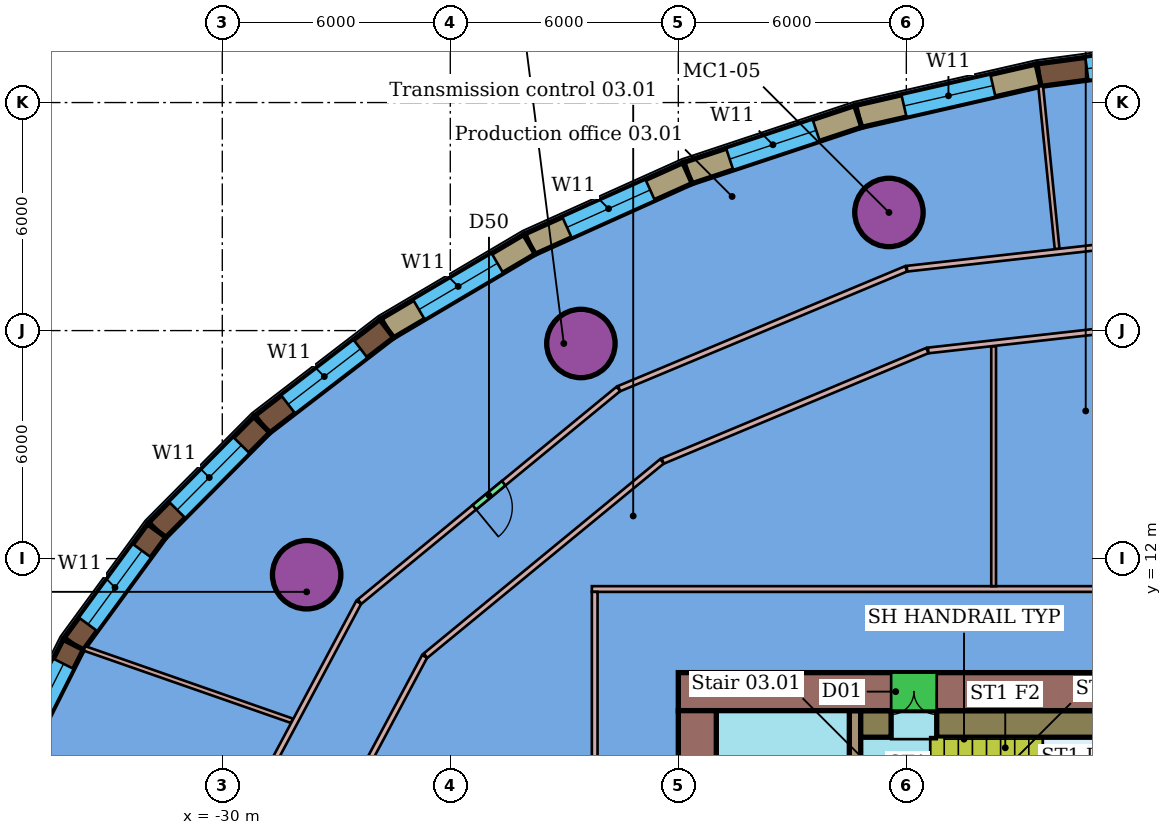
"""IFC4 building model, lengths in metres.
Left out: names, types, materials, properties, quantities, classifications, styles, units other than length and angle.
Written with IfcOpenShell. Run it as: python <this file> out.ifc"""

import sys

from ifc_helpers import new_model, si_unit, direction, frame, frame_2d, origin, origin_2d, place, context, subcontext, project, spatial, rectangle, hollow_circle, extrude, element, fill, save


model = new_model("IFC4")
c1 = context("Model", 3, precision=1e-05, world=origin(), true_north=direction((0.0, 1.0)))
c2 = subcontext(c1, "Body", "Model", "MODEL_VIEW")
j1 = project(units=[si_unit("LENGTHUNIT", "METRE"), si_unit("PLANEANGLEUNIT", "RADIAN")], contexts=[c1])
p1 = place(None, origin())
s1 = spatial("IfcSite", under=j1, at=p1, CompositionType="ELEMENT")
p2 = place(p1, origin())
s2 = spatial("IfcBuilding", under=s1, at=p2, CompositionType="ELEMENT")
p3 = place(p2, frame((0.0, 0.0, 26.0)))
s3 = spatial("IfcBuildingStorey", under=s2, at=p3, CompositionType="ELEMENT", Elevation=26.0)
for number, where, z_axis, x_axis in (
    (1, (-12.458, 21.108, 0.0), (0.0, 0.0, 1.0), (1.0, 0.0, 0.0)),
    (2, (-20.563, 17.66, 0.0), (0.0, 0.0, 1.0), (1.0, 0.0, 0.0)),
    (3, (-27.78, 11.576, 0.0), (0.0, 0.0, 1.0), (1.0, 0.0, 0.0)),
):
    element("IfcColumn", number, at=place(p3, frame(where, z_axis=z_axis, x_axis=x_axis)), inside=s3, PredefinedType="COLUMN", context=c2, shape_type="SweptSolid", body=[
        extrude(hollow_circle(Radius=0.9, WallThickness=0.06, at=origin_2d()), origin(), (0.0, 0.0, 1.0), 5.3),
    ])
p4 = place(p3, frame((-20.275, 11.2, 0.0), z_axis=(0.0, 0.0, 1.0), x_axis=(1.0, 0.0, 0.0)))
e4 = element("IfcWall", 4, at=p4, inside=s3, PredefinedType="PARTITIONING", context=c2, shape_type="SweptSolid", body=[
    extrude(rectangle(XDim=32.372, YDim=0.15, at=frame_2d((16.186, 0.0))), origin(), (0.0, 0.0, 1.0), 4.6),
])
p5 = place(p3, frame((-20.2, -9.075, 0.0), z_axis=(0.0, 0.0, 1.0), x_axis=(0.0, 1.0, 0.0)))
e5 = element("IfcWall", 5, at=p5, inside=s3, PredefinedType="PARTITIONING", context=c2, shape_type="SweptSolid", body=[
    extrude(rectangle(XDim=20.2, YDim=0.15, at=frame_2d((10.1, 0.0))), origin(), (0.0, 0.0, 1.0), 4.6),
])
p6 = place(p3, frame((-9.703, 11.275, 0.0), z_axis=(0.0, 0.0, 1.0), x_axis=(0.0, 1.0, 0.0)))
e6 = element("IfcWall", 6, at=p6, inside=s3, PredefinedType="PARTITIONING", context=c2, shape_type="SweptSolid", body=[
    extrude(rectangle(XDim=6.313, YDim=0.125, at=frame_2d((3.156, 0.0))), origin(), (0.0, 0.0, 1.0), 4.6),
])
p7 = place(p3, frame((-11.425, 17.477, 0.0), z_axis=(0.0, 0.0, 1.0), x_axis=(0.993762158865, 0.111520274427, 0.0)))
e7 = element("IfcWall", 7, at=p7, inside=s3, PredefinedType="PARTITIONING", context=c2, shape_type="SweptSolid", body=[
    extrude(rectangle(XDim=7.334, YDim=0.15, at=frame_2d((3.667, 0.0))), origin(), (0.0, 0.0, 1.0), 4.6),
])
p8 = place(p3, frame((-28.674, 1.933, 0.0), z_axis=(0.0, 0.0, 1.0), x_axis=(0.470743396375, 0.882270171076, 0.0)))
e8 = element("IfcWall", 8, at=p8, inside=s3, PredefinedType="PARTITIONING", context=c2, shape_type="SweptSolid", body=[
    extrude(rectangle(XDim=8.493, YDim=0.15, at=frame_2d((4.247, 0.0))), origin(), (0.0, 0.0, 1.0), 4.6),
])
p9 = place(p3, frame((-24.652, 9.446, 0.0), z_axis=(0.0, 0.0, 1.0), x_axis=(0.772569565922, 0.634930126716, 0.0)))
e9 = element("IfcWall", 9, at=p9, inside=s3, PredefinedType="PARTITIONING", context=c2, shape_type="SweptSolid", body=[
    extrude(rectangle(XDim=8.053, YDim=0.15, at=frame_2d((4.026, 0.0))), origin(), (0.0, 0.0, 1.0), 4.6),
])
p10 = place(p3, frame((-18.41, 14.568, 0.0), z_axis=(0.0, 0.0, 1.0), x_axis=(0.922821127206, 0.38522872061, 0.0)))
e10 = element("IfcWall", 10, at=p10, inside=s3, PredefinedType="PARTITIONING", context=c2, shape_type="SweptSolid", body=[
    extrude(rectangle(XDim=7.545, YDim=0.15, at=frame_2d((3.773, 0.0))), origin(), (0.0, 0.0, 1.0), 4.6),
])
p11 = place(p3, frame((-8.464, 24.426, 0.0), z_axis=(0.0, 0.0, 1.0), x_axis=(0.100391964529, -0.994947965201, 0.0)))
e11 = element("IfcWall", 11, at=p11, inside=s3, PredefinedType="PARTITIONING", context=c2, shape_type="SweptSolid", body=[
    extrude(rectangle(XDim=4.3, YDim=0.125, at=frame_2d((2.15, 0.0))), origin(), (0.0, 0.0, 1.0), 4.6),
])
p12 = place(p3, frame((-11.982, 19.628, 0.0), z_axis=(0.0, 0.0, 1.0), x_axis=(0.993764533241, 0.11149911422, 0.0)))
e12 = element("IfcWall", 12, at=p12, inside=s3, PredefinedType="PARTITIONING", context=c2, shape_type="SweptSolid", body=[
    extrude(rectangle(XDim=7.981, YDim=0.15, at=frame_2d((3.991, 0.0))), origin(), (0.0, 0.0, 1.0), 4.6),
])
p13 = place(p3, frame((-33.626, 9.637, 0.0), z_axis=(0.0, 0.0, 1.0), x_axis=(0.944198348273, -0.329377411368, 0.0)))
e13 = element("IfcWall", 13, at=p13, inside=s3, PredefinedType="PARTITIONING", context=c2, shape_type="SweptSolid", body=[
    extrude(rectangle(XDim=5.779, YDim=0.125, at=frame_2d((2.89, 0.0))), origin(), (0.0, 0.0, 1.0), 4.6),
])
p14 = place(p3, frame((-19.556, 16.473, 0.0), z_axis=(0.0, 0.0, 1.0), x_axis=(0.922818121352, 0.385235921097, 0.0)))
e14 = element("IfcWall", 14, at=p14, inside=s3, PredefinedType="PARTITIONING", context=c2, shape_type="SweptSolid", body=[
    extrude(rectangle(XDim=8.184, YDim=0.15, at=frame_2d((4.092, 0.0))), origin(), (0.0, 0.0, 1.0), 4.6),
])
p15 = place(p3, frame((-19.577, 16.465, 0.0), z_axis=(0.0, 0.0, 1.0), x_axis=(-0.772575830308, -0.634922504266, 0.0)))
e15 = element("IfcWall", 15, at=p15, inside=s3, PredefinedType="PARTITIONING", context=c2, shape_type="SweptSolid", body=[
    extrude(rectangle(XDim=8.815, YDim=0.15, at=frame_2d((4.407, 0.0))), origin(), (0.0, 0.0, 1.0), 4.6),
])
p16 = place(p15, frame((3.907, 0.0, 0.0)))
e16 = element("IfcOpeningElement", 16, at=p16, cuts=e15, PredefinedType="OPENING", context=c2, shape_type="SweptSolid", body=[
    extrude(rectangle(XDim=1.0, YDim=2.1, at=frame_2d((0.5, 1.05))), frame((0.0, 0.085, 0.0), z_axis=(0.0, -1.0, 0.0), x_axis=(1.0, 0.0, 0.0)), (0.0, 0.0, 1.0), 0.17),
])
p17 = place(p3, frame((-30.898, 2.438, 0.0), z_axis=(0.0, 0.0, 1.0), x_axis=(0.470742429837, 0.88227068678, 0.0)))
e17 = element("IfcWall", 17, at=p17, inside=s3, PredefinedType="PARTITIONING", context=c2, shape_type="SweptSolid", body=[
    extrude(rectangle(XDim=9.532, YDim=0.15, at=frame_2d((4.766, 0.0))), origin(), (0.0, 0.0, 1.0), 4.6),
])
p18 = place(p3, frame((-3.603, 25.379, 0.0), z_axis=(0.0, 0.0, 1.0), x_axis=(-0.991143444913, -0.132795600853, 0.0)))
e18 = element("IfcWall", 18, at=p18, inside=s3, PredefinedType="SOLIDWALL", context=c2, shape_type="SweptSolid", body=[
    extrude(rectangle(XDim=4.96, YDim=0.6, at=frame_2d((2.48, 0.0))), origin(), (0.0, 0.0, 1.0), 5.3),
])
p19 = place(p18, frame((1.28, 0.0, 1.1)))
e19 = element("IfcOpeningElement", 19, at=p19, cuts=e18, PredefinedType="OPENING", context=c2, shape_type="SweptSolid", body=[
    extrude(rectangle(XDim=2.4, YDim=1.4, at=frame_2d((1.2, 0.7))), frame((0.0, 0.31, 0.0), z_axis=(0.0, -1.0, 0.0), x_axis=(1.0, 0.0, 0.0)), (0.0, 0.0, 1.0), 0.62),
])
p20 = place(p3, frame((-8.519, 24.72, 0.0), z_axis=(0.0, 0.0, 1.0), x_axis=(-0.97483982486, -0.222906518224, 0.0)))
e20 = element("IfcWall", 20, at=p20, inside=s3, PredefinedType="SOLIDWALL", context=c2, shape_type="SweptSolid", body=[
    extrude(rectangle(XDim=4.867, YDim=0.6, at=frame_2d((2.434, 0.0))), origin(), (0.0, 0.0, 1.0), 4.9),
])
p21 = place(p20, frame((1.234, 0.0, 1.1)))
e21 = element("IfcOpeningElement", 21, at=p21, cuts=e20, PredefinedType="OPENING", context=c2, shape_type="SweptSolid", body=[
    extrude(rectangle(XDim=2.4, YDim=1.4, at=frame_2d((1.2, 0.7))), frame((0.0, 0.31, 0.0), z_axis=(0.0, -1.0, 0.0), x_axis=(1.0, 0.0, 0.0)), (0.0, 0.0, 1.0), 0.62),
])
p22 = place(p3, frame((-13.264, 23.635, 0.0), z_axis=(0.0, 0.0, 1.0), x_axis=(-0.94901810672, -0.315221561949, 0.0)))
e22 = element("IfcWall", 22, at=p22, inside=s3, PredefinedType="SOLIDWALL", context=c2, shape_type="SweptSolid", body=[
    extrude(rectangle(XDim=4.732, YDim=0.6, at=frame_2d((2.366, 0.0))), origin(), (0.0, 0.0, 1.0), 4.9),
])
p23 = place(p22, frame((1.166, 0.0, 1.1)))
e23 = element("IfcOpeningElement", 23, at=p23, cuts=e22, PredefinedType="OPENING", context=c2, shape_type="SweptSolid", body=[
    extrude(rectangle(XDim=2.4, YDim=1.4, at=frame_2d((1.2, 0.7))), frame((0.0, 0.31, 0.0), z_axis=(0.0, -1.0, 0.0), x_axis=(1.0, 0.0, 0.0)), (0.0, 0.0, 1.0), 0.62),
])
p24 = place(p3, frame((-17.755, 22.144, 0.0), z_axis=(0.0, 0.0, 1.0), x_axis=(-0.911894462824, -0.410424766152, 0.0)))
e24 = element("IfcWall", 24, at=p24, inside=s3, PredefinedType="SOLIDWALL", context=c2, shape_type="SweptSolid", body=[
    extrude(rectangle(XDim=4.561, YDim=0.6, at=frame_2d((2.281, 0.0))), origin(), (0.0, 0.0, 1.0), 4.9),
])
p25 = place(p24, frame((1.081, 0.0, 1.1)))
e25 = element("IfcOpeningElement", 25, at=p25, cuts=e24, PredefinedType="OPENING", context=c2, shape_type="SweptSolid", body=[
    extrude(rectangle(XDim=2.4, YDim=1.4, at=frame_2d((1.2, 0.7))), frame((0.0, 0.31, 0.0), z_axis=(0.0, -1.0, 0.0), x_axis=(1.0, 0.0, 0.0)), (0.0, 0.0, 1.0), 0.62),
])
p26 = place(p3, frame((-21.915, 20.272, 0.0), z_axis=(0.0, 0.0, 1.0), x_axis=(-0.861017868942, -0.508574703818, 0.0)))
e26 = element("IfcWall", 26, at=p26, inside=s3, PredefinedType="SOLIDWALL", context=c2, shape_type="SweptSolid", body=[
    extrude(rectangle(XDim=4.363, YDim=0.6, at=frame_2d((2.181, 0.0))), origin(), (0.0, 0.0, 1.0), 4.9),
])
p27 = place(p26, frame((0.981, 0.0, 1.1)))
e27 = element("IfcOpeningElement", 27, at=p27, cuts=e26, PredefinedType="OPENING", context=c2, shape_type="SweptSolid", body=[
    extrude(rectangle(XDim=2.4, YDim=1.4, at=frame_2d((1.2, 0.7))), frame((0.0, 0.31, 0.0), z_axis=(0.0, -1.0, 0.0), x_axis=(1.0, 0.0, 0.0)), (0.0, 0.0, 1.0), 0.62),
])
p28 = place(p3, frame((-25.671, 18.053, 0.0), z_axis=(0.0, 0.0, 1.0), x_axis=(-0.793065901338, -0.609135843745, 0.0)))
e28 = element("IfcWall", 28, at=p28, inside=s3, PredefinedType="SOLIDWALL", context=c2, shape_type="SweptSolid", body=[
    extrude(rectangle(XDim=4.147, YDim=0.6, at=frame_2d((2.073, 0.0))), origin(), (0.0, 0.0, 1.0), 5.3),
])
p29 = place(p28, frame((0.873, 0.0, 1.1)))
e29 = element("IfcOpeningElement", 29, at=p29, cuts=e28, PredefinedType="OPENING", context=c2, shape_type="SweptSolid", body=[
    extrude(rectangle(XDim=2.4, YDim=1.4, at=frame_2d((1.2, 0.7))), frame((0.0, 0.31, 0.0), z_axis=(0.0, -1.0, 0.0), x_axis=(1.0, 0.0, 0.0)), (0.0, 0.0, 1.0), 0.62),
])
p30 = place(p3, frame((-28.959, 15.527, 0.0), z_axis=(0.0, 0.0, 1.0), x_axis=(-0.704303183564, -0.709899306678, 0.0)))
e30 = element("IfcWall", 30, at=p30, inside=s3, PredefinedType="SOLIDWALL", context=c2, shape_type="SweptSolid", body=[
    extrude(rectangle(XDim=3.927, YDim=0.6, at=frame_2d((1.963, 0.0))), origin(), (0.0, 0.0, 1.0), 5.3),
])
p31 = place(p30, frame((0.763, 0.0, 1.1)))
e31 = element("IfcOpeningElement", 31, at=p31, cuts=e30, PredefinedType="OPENING", context=c2, shape_type="SweptSolid", body=[
    extrude(rectangle(XDim=2.4, YDim=1.4, at=frame_2d((1.2, 0.7))), frame((0.0, 0.31, 0.0), z_axis=(0.0, -1.0, 0.0), x_axis=(1.0, 0.0, 0.0)), (0.0, 0.0, 1.0), 0.62),
])
p32 = place(p3, frame((-31.725, 12.74, 0.0), z_axis=(0.0, 0.0, 1.0), x_axis=(-0.59073426953, -0.806866174035, 0.0)))
e32 = element("IfcWall", 32, at=p32, inside=s3, PredefinedType="SOLIDWALL", context=c2, shape_type="SweptSolid", body=[
    extrude(rectangle(XDim=3.718, YDim=0.6, at=frame_2d((1.859, 0.0))), origin(), (0.0, 0.0, 1.0), 5.3),
])
p33 = place(p32, frame((0.659, 0.0, 1.1)))
e33 = element("IfcOpeningElement", 33, at=p33, cuts=e32, PredefinedType="OPENING", context=c2, shape_type="SweptSolid", body=[
    extrude(rectangle(XDim=2.4, YDim=1.4, at=frame_2d((1.2, 0.7))), frame((0.0, 0.31, 0.0), z_axis=(0.0, -1.0, 0.0), x_axis=(1.0, 0.0, 0.0)), (0.0, 0.0, 1.0), 0.62),
])
p34 = place(p3, frame((-33.921, 9.74, 0.0), z_axis=(0.0, 0.0, 1.0), x_axis=(-0.450137579264, -0.892959215045, 0.0)))
e34 = element("IfcWall", 34, at=p34, inside=s3, PredefinedType="SOLIDWALL", context=c2, shape_type="SweptSolid", body=[
    extrude(rectangle(XDim=3.537, YDim=0.6, at=frame_2d((1.769, 0.0))), origin(), (0.0, 0.0, 1.0), 5.3),
])
p35 = place(p34, frame((0.569, 0.0, 1.1)))
e35 = element("IfcOpeningElement", 35, at=p35, cuts=e34, PredefinedType="OPENING", context=c2, shape_type="SweptSolid", body=[
    extrude(rectangle(XDim=2.4, YDim=1.4, at=frame_2d((1.2, 0.7))), frame((0.0, 0.31, 0.0), z_axis=(0.0, -1.0, 0.0), x_axis=(1.0, 0.0, 0.0)), (0.0, 0.0, 1.0), 0.62),
])
p36 = place(p3, frame((-6.0, 8.5, 0.0), z_axis=(0.0, 0.0, 1.0), x_axis=(-1.0, 0.0, 0.0)))
e36 = element("IfcWall", 36, at=p36, inside=s3, PredefinedType="SHEAR", context=c2, shape_type="SweptSolid", body=[
    extrude(rectangle(XDim=12.0, YDim=1.0, at=frame_2d((6.0, 0.0))), origin(), (0.0, 0.0, 1.0), 5.2),
])
p37 = place(p36, frame((5.2, 0.0, 0.0)))
e37 = element("IfcOpeningElement", 37, at=p37, cuts=e36, PredefinedType="OPENING", context=c2, shape_type="SweptSolid", body=[
    extrude(rectangle(XDim=1.2, YDim=2.1, at=frame_2d((0.6, 1.05))), frame((0.0, 0.51, 0.0), z_axis=(0.0, -1.0, 0.0), x_axis=(1.0, 0.0, 0.0)), (0.0, 0.0, 1.0), 1.02),
])
p38 = place(p3, frame((-17.5, 8.0, 0.0), z_axis=(0.0, 0.0, 1.0), x_axis=(0.0, -1.0, 0.0)))
e38 = element("IfcWall", 38, at=p38, inside=s3, PredefinedType="SHEAR", context=c2, shape_type="SweptSolid", body=[
    extrude(rectangle(XDim=16.0, YDim=1.0, at=frame_2d((8.0, 0.0))), origin(), (0.0, 0.0, 1.0), 5.2),
])
p39 = place(p38, frame((11.9, 0.0, 0.0)))
e39 = element("IfcOpeningElement", 39, at=p39, cuts=e38, PredefinedType="OPENING", context=c2, shape_type="SweptSolid", body=[
    extrude(rectangle(XDim=1.2, YDim=2.1, at=frame_2d((0.6, 1.05))), frame((0.0, 0.51, 0.0), z_axis=(0.0, -1.0, 0.0), x_axis=(1.0, 0.0, 0.0)), (0.0, 0.0, 1.0), 1.02),
])
p40 = place(p38, frame((2.9, 0.0, 0.0)))
e40 = element("IfcOpeningElement", 40, at=p40, cuts=e38, PredefinedType="OPENING", context=c2, shape_type="SweptSolid", body=[
    extrude(rectangle(XDim=1.2, YDim=2.1, at=frame_2d((0.6, 1.05))), frame((0.0, 0.51, 0.0), z_axis=(0.0, -1.0, 0.0), x_axis=(1.0, 0.0, 0.0)), (0.0, 0.0, 1.0), 1.02),
])
p41 = place(p3, frame((-13.35, 8.0, 0.0), z_axis=(0.0, 0.0, 1.0), x_axis=(0.0, -1.0, 0.0)))
e41 = element("IfcWall", 41, at=p41, inside=s3, PredefinedType="SHEAR", context=c2, shape_type="SweptSolid", body=[
    extrude(rectangle(XDim=16.0, YDim=0.3, at=frame_2d((8.0, 0.0))), origin(), (0.0, 0.0, 1.0), 5.2),
])
p42 = place(p41, frame((7.25, 0.0, 0.0)))
e42 = element("IfcOpeningElement", 42, at=p42, cuts=e41, PredefinedType="OPENING", context=c2, shape_type="SweptSolid", body=[
    extrude(rectangle(XDim=1.5, YDim=2.1, at=frame_2d((0.75, 1.05))), frame((0.0, 0.16, 0.0), z_axis=(0.0, -1.0, 0.0), x_axis=(1.0, 0.0, 0.0)), (0.0, 0.0, 1.0), 0.32),
])
p43 = place(p3, frame((-13.2, 7.65, 0.0), z_axis=(0.0, 0.0, 1.0), x_axis=(1.0, 0.0, 0.0)))
e43 = element("IfcWall", 43, at=p43, inside=s3, PredefinedType="SHEAR", context=c2, shape_type="SweptSolid", body=[
    extrude(rectangle(XDim=0.8, YDim=0.7, at=frame_2d((0.4, 0.0))), origin(), (0.0, 0.0, 1.0), 5.2),
])
p44 = place(p3, frame((-11.2, 7.65, 0.0), z_axis=(0.0, 0.0, 1.0), x_axis=(1.0, 0.0, 0.0)))
e44 = element("IfcWall", 44, at=p44, inside=s3, PredefinedType="SHEAR", context=c2, shape_type="SweptSolid", body=[
    extrude(rectangle(XDim=5.05, YDim=0.7, at=frame_2d((2.525, 0.0))), origin(), (0.0, 0.0, 1.0), 5.2),
])
p45 = place(p16, origin())
e45 = element("IfcDoor", 45, at=p45, inside=s3, OperationType="SINGLE_SWING_RIGHT", PredefinedType="DOOR", context=c2, shape_type="SweptSolid", body=[
    extrude(rectangle(XDim=1.0, YDim=2.1, at=frame_2d((0.5, 1.05))), frame((0.0, 0.025, 0.0), z_axis=(0.0, -1.0, 0.0), x_axis=(1.0, 0.0, 0.0)), (0.0, 0.0, 1.0), 0.05),
])
fill(e16, e45)
p46 = place(p19, origin())
e46 = element("IfcWindow", 46, at=p46, inside=s3, PartitioningType="SINGLE_PANEL", PredefinedType="WINDOW", context=c2, shape_type="SweptSolid", body=[
    extrude(rectangle(XDim=2.4, YDim=1.4, at=frame_2d((1.2, 0.7))), frame((0.0, 0.03, 0.0), z_axis=(0.0, -1.0, 0.0), x_axis=(1.0, 0.0, 0.0)), (0.0, 0.0, 1.0), 0.06),
])
fill(e19, e46)
p47 = place(p21, origin())
e47 = element("IfcWindow", 47, at=p47, inside=s3, PartitioningType="SINGLE_PANEL", PredefinedType="WINDOW", context=c2, shape_type="SweptSolid", body=[
    extrude(rectangle(XDim=2.4, YDim=1.4, at=frame_2d((1.2, 0.7))), frame((0.0, 0.03, 0.0), z_axis=(0.0, -1.0, 0.0), x_axis=(1.0, 0.0, 0.0)), (0.0, 0.0, 1.0), 0.06),
])
fill(e21, e47)
p48 = place(p23, origin())
e48 = element("IfcWindow", 48, at=p48, inside=s3, PartitioningType="SINGLE_PANEL", PredefinedType="WINDOW", context=c2, shape_type="SweptSolid", body=[
    extrude(rectangle(XDim=2.4, YDim=1.4, at=frame_2d((1.2, 0.7))), frame((0.0, 0.03, 0.0), z_axis=(0.0, -1.0, 0.0), x_axis=(1.0, 0.0, 0.0)), (0.0, 0.0, 1.0), 0.06),
])
fill(e23, e48)
p49 = place(p25, origin())
e49 = element("IfcWindow", 49, at=p49, inside=s3, PartitioningType="SINGLE_PANEL", PredefinedType="WINDOW", context=c2, shape_type="SweptSolid", body=[
    extrude(rectangle(XDim=2.4, YDim=1.4, at=frame_2d((1.2, 0.7))), frame((0.0, 0.03, 0.0), z_axis=(0.0, -1.0, 0.0), x_axis=(1.0, 0.0, 0.0)), (0.0, 0.0, 1.0), 0.06),
])
fill(e25, e49)
p50 = place(p27, origin())
e50 = element("IfcWindow", 50, at=p50, inside=s3, PartitioningType="SINGLE_PANEL", PredefinedType="WINDOW", context=c2, shape_type="SweptSolid", body=[
    extrude(rectangle(XDim=2.4, YDim=1.4, at=frame_2d((1.2, 0.7))), frame((0.0, 0.03, 0.0), z_axis=(0.0, -1.0, 0.0), x_axis=(1.0, 0.0, 0.0)), (0.0, 0.0, 1.0), 0.06),
])
fill(e27, e50)
p51 = place(p29, origin())
e51 = element("IfcWindow", 51, at=p51, inside=s3, PartitioningType="SINGLE_PANEL", PredefinedType="WINDOW", context=c2, shape_type="SweptSolid", body=[
    extrude(rectangle(XDim=2.4, YDim=1.4, at=frame_2d((1.2, 0.7))), frame((0.0, 0.03, 0.0), z_axis=(0.0, -1.0, 0.0), x_axis=(1.0, 0.0, 0.0)), (0.0, 0.0, 1.0), 0.06),
])
fill(e29, e51)
p52 = place(p31, origin())
e52 = element("IfcWindow", 52, at=p52, inside=s3, PartitioningType="SINGLE_PANEL", PredefinedType="WINDOW", context=c2, shape_type="SweptSolid", body=[
    extrude(rectangle(XDim=2.4, YDim=1.4, at=frame_2d((1.2, 0.7))), frame((0.0, 0.03, 0.0), z_axis=(0.0, -1.0, 0.0), x_axis=(1.0, 0.0, 0.0)), (0.0, 0.0, 1.0), 0.06),
])
fill(e31, e52)
p53 = place(p33, origin())
e53 = element("IfcWindow", 53, at=p53, inside=s3, PartitioningType="SINGLE_PANEL", PredefinedType="WINDOW", context=c2, shape_type="SweptSolid", body=[
    extrude(rectangle(XDim=2.4, YDim=1.4, at=frame_2d((1.2, 0.7))), frame((0.0, 0.03, 0.0), z_axis=(0.0, -1.0, 0.0), x_axis=(1.0, 0.0, 0.0)), (0.0, 0.0, 1.0), 0.06),
])
fill(e33, e53)
p54 = place(p35, origin())
e54 = element("IfcWindow", 54, at=p54, inside=s3, PartitioningType="SINGLE_PANEL", PredefinedType="WINDOW", context=c2, shape_type="SweptSolid", body=[
    extrude(rectangle(XDim=2.4, YDim=1.4, at=frame_2d((1.2, 0.7))), frame((0.0, 0.03, 0.0), z_axis=(0.0, -1.0, 0.0), x_axis=(1.0, 0.0, 0.0)), (0.0, 0.0, 1.0), 0.06),
])
fill(e35, e54)
p55 = place(p37, origin())
e55 = element("IfcDoor", 55, at=p55, inside=s3, OperationType="DOUBLE_DOOR_SINGLE_SWING", PredefinedType="NOTDEFINED", context=c2, shape_type="SweptSolid", body=[
    extrude(rectangle(XDim=1.2, YDim=2.1, at=frame_2d((0.6, 1.05))), frame((0.0, 0.025, 0.0), z_axis=(0.0, -1.0, 0.0), x_axis=(1.0, 0.0, 0.0)), (0.0, 0.0, 1.0), 0.05),
])
fill(e37, e55)
save(model, sys.argv[1])
